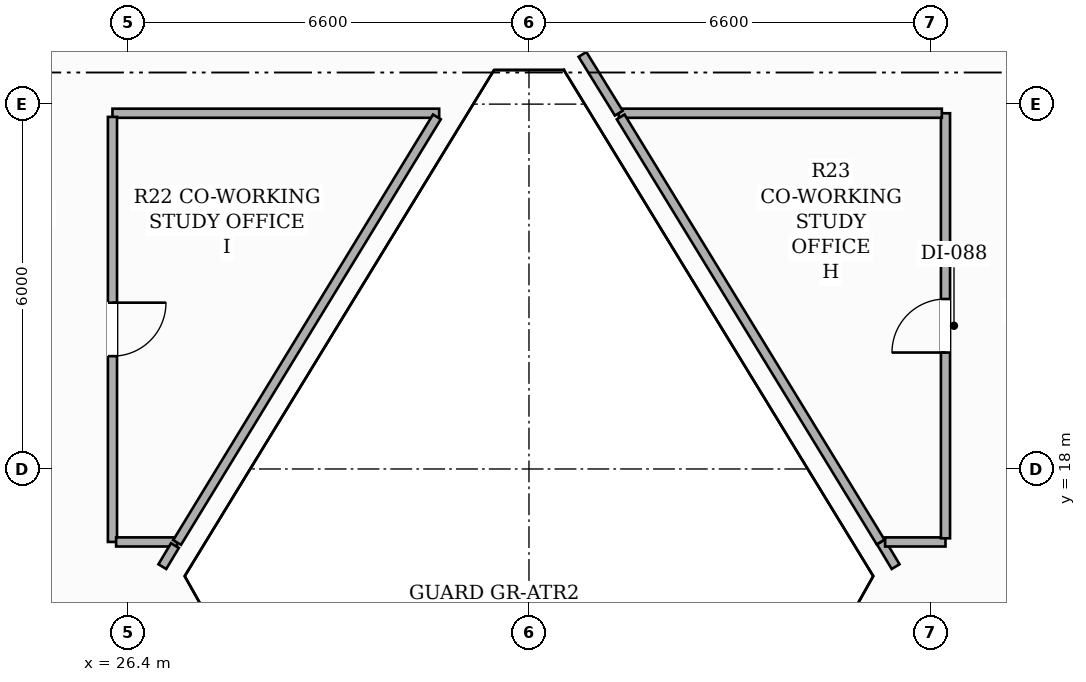
"""IFC4 building model, lengths in metres.
Left out: names, types, materials, properties, quantities, classifications, styles, units other than length and angle.
Written with IfcOpenShell. Run it as: python <this file> out.ifc"""

import sys

from ifc_helpers import new_model, si_unit, direction, frame, frame_2d, origin, place, context, subcontext, project, spatial, rectangle, extrude, element, fill, save


model = new_model("IFC4")
c1 = context("Model", 3, precision=1e-05, world=origin(), true_north=direction((0.0, 1.0)))
c2 = subcontext(c1, "Body", "Model", "MODEL_VIEW")
j1 = project(units=[si_unit("LENGTHUNIT", "METRE"), si_unit("PLANEANGLEUNIT", "RADIAN")], contexts=[c1])
p1 = place(None, origin())
s1 = spatial("IfcSite", under=j1, at=p1, CompositionType="ELEMENT")
p2 = place(p1, origin())
s2 = spatial("IfcBuilding", under=s1, at=p2, CompositionType="ELEMENT")
p3 = place(p2, frame((0.0, 0.0, 26.9)))
s3 = spatial("IfcBuildingStorey", under=s2, at=p3, CompositionType="ELEMENT", Elevation=26.9)
p4 = place(p3, frame((31.523, 23.85, 0.0), z_axis=(0.0, 0.0, 1.0), x_axis=(-1.0, 0.0, 0.0)))
e1 = element("IfcWall", 1, at=p4, inside=s3, PredefinedType="PARTITIONING", context=c2, shape_type="SweptSolid", body=[
    extrude(rectangle(XDim=5.373, YDim=0.15, at=frame_2d((2.687, 0.0))), origin(), (0.0, 0.0, 1.0), 2.669),
])
p5 = place(p3, frame((26.15, 23.79, 0.0), z_axis=(0.0, 0.0, 1.0), x_axis=(0.0, -1.0, 0.0)))
e2 = element("IfcWall", 2, at=p5, inside=s3, PredefinedType="PARTITIONING", context=c2, shape_type="SweptSolid", body=[
    extrude(rectangle(XDim=6.99, YDim=0.15, at=frame_2d((3.495, 0.0))), origin(), (0.0, 0.0, 1.0), 2.669),
])
p6 = place(p5, frame((3.055, 0.0, 0.0)))
e3 = element("IfcOpeningElement", 3, at=p6, cuts=e2, PredefinedType="OPENING", context=c2, shape_type="SweptSolid", body=[
    extrude(rectangle(XDim=0.88, YDim=2.1, at=frame_2d((0.44, 1.05))), frame((0.0, 0.085, 0.0), z_axis=(0.0, -1.0, 0.0), x_axis=(1.0, 0.0, 0.0)), (0.0, 0.0, 1.0), 0.17),
])
p7 = place(p3, frame((26.21, 16.8, 0.0), z_axis=(0.0, 0.0, 1.0), x_axis=(1.0, 0.0, 0.0)))
e4 = element("IfcWall", 4, at=p7, inside=s3, PredefinedType="PARTITIONING", context=c2, shape_type="SweptSolid", body=[
    extrude(rectangle(XDim=1.003, YDim=0.15, at=frame_2d((0.501, 0.0))), origin(), (0.0, 0.0, 1.0), 3.06),
])
p8 = place(p3, frame((27.177, 16.74, 0.0), z_axis=(0.0, 0.0, 1.0), x_axis=(-0.513515835534, -0.858080116688, 0.0)))
e5 = element("IfcWall", 5, at=p8, inside=s3, PredefinedType="PARTITIONING", context=c2, shape_type="SweptSolid", body=[
    extrude(rectangle(XDim=0.403, YDim=0.15, at=frame_2d((0.202, 0.0))), origin(), (0.0, 0.0, 1.0), 3.06),
])
p9 = place(p3, frame((39.03, 16.394, 0.0), z_axis=(0.0, 0.0, 1.0), x_axis=(-0.51343298076, 0.858129695482, 0.0)))
e6 = element("IfcWall", 6, at=p9, inside=s3, PredefinedType="PARTITIONING", context=c2, shape_type="SweptSolid", body=[
    extrude(rectangle(XDim=0.473, YDim=0.15, at=frame_2d((0.237, 0.0))), origin(), (0.0, 0.0, 1.0), 3.06),
])
p10 = place(p3, frame((38.857, 16.8, 0.0), z_axis=(0.0, 0.0, 1.0), x_axis=(1.0, 0.0, 0.0)))
e7 = element("IfcWall", 7, at=p10, inside=s3, PredefinedType="PARTITIONING", context=c2, shape_type="SweptSolid", body=[
    extrude(rectangle(XDim=0.993, YDim=0.15, at=frame_2d((0.497, 0.0))), origin(), (0.0, 0.0, 1.0), 3.06),
])
p11 = place(p3, frame((39.85, 16.86, 0.0), z_axis=(0.0, 0.0, 1.0), x_axis=(0.0, 1.0, 0.0)))
e8 = element("IfcWall", 8, at=p11, inside=s3, PredefinedType="PARTITIONING", context=c2, shape_type="SweptSolid", body=[
    extrude(rectangle(XDim=6.99, YDim=0.15, at=frame_2d((3.495, 0.0))), origin(), (0.0, 0.0, 1.0), 2.669),
])
p12 = place(p11, frame((3.055, 0.0, 0.0)))
e9 = element("IfcOpeningElement", 9, at=p12, cuts=e8, PredefinedType="OPENING", context=c2, shape_type="SweptSolid", body=[
    extrude(rectangle(XDim=0.88, YDim=2.1, at=frame_2d((0.44, 1.05))), frame((0.0, 0.085, 0.0), z_axis=(0.0, -1.0, 0.0), x_axis=(1.0, 0.0, 0.0)), (0.0, 0.0, 1.0), 0.17),
])
p13 = place(p3, frame((39.79, 23.85, 0.0), z_axis=(0.0, 0.0, 1.0), x_axis=(-1.0, 0.0, 0.0)))
e10 = element("IfcWall", 10, at=p13, inside=s3, PredefinedType="PARTITIONING", context=c2, shape_type="SweptSolid", body=[
    extrude(rectangle(XDim=5.313, YDim=0.15, at=frame_2d((2.656, 0.0))), origin(), (0.0, 0.0, 1.0), 2.669),
])
p14 = place(p3, frame((34.477, 23.851, 0.0), z_axis=(0.0, 0.0, 1.0), x_axis=(-0.52541513414, 0.8508460124, 0.0)))
e11 = element("IfcWall", 11, at=p14, inside=s3, PredefinedType="PARTITIONING", context=c2, shape_type="SweptSolid", body=[
    extrude(rectangle(XDim=1.136, YDim=0.15, at=frame_2d((0.568, 0.0))), origin(), (0.0, 0.0, 1.0), 3.06),
])
p15 = place(p3, frame((27.213, 16.791, 0.0), z_axis=(0.0, 0.0, 1.0), x_axis=(0.521095914239, 0.853498124288, 0.0)))
e12 = element("IfcWall", 12, at=p15, inside=s3, PredefinedType="PARTITIONING", context=c2, shape_type="SweptSolid", body=[
    extrude(rectangle(XDim=8.2, YDim=0.15, at=frame_2d((4.1, 0.0))), origin(), (0.0, 0.0, 1.0), 2.669),
])
p16 = place(p3, frame((34.508, 23.79, 0.0), z_axis=(0.0, 0.0, 1.0), x_axis=(0.52163195406, -0.853170618636, 0.0)))
e13 = element("IfcWall", 13, at=p16, inside=s3, PredefinedType="PARTITIONING", context=c2, shape_type="SweptSolid", body=[
    extrude(rectangle(XDim=8.195, YDim=0.15, at=frame_2d((4.098, 0.0))), origin(), (0.0, 0.0, 1.0), 2.669),
])
p17 = place(p12, origin())
e14 = element("IfcDoor", 14, at=p17, inside=s3, OperationType="SINGLE_SWING_LEFT", PredefinedType="DOOR", context=c2, shape_type="SweptSolid", body=[
    extrude(rectangle(XDim=0.88, YDim=2.1, at=frame_2d((0.44, 1.05))), frame((0.0, 0.025, 0.0), z_axis=(0.0, -1.0, 0.0), x_axis=(1.0, 0.0, 0.0)), (0.0, 0.0, 1.0), 0.05),
])
fill(e9, e14)
p18 = place(p6, origin())
e15 = element("IfcDoor", 15, at=p18, inside=s3, OperationType="SINGLE_SWING_LEFT", PredefinedType="DOOR", context=c2, shape_type="SweptSolid", body=[
    extrude(rectangle(XDim=0.88, YDim=2.1, at=frame_2d((0.44, 1.05))), frame((0.0, 0.025, 0.0), z_axis=(0.0, -1.0, 0.0), x_axis=(1.0, 0.0, 0.0)), (0.0, 0.0, 1.0), 0.05),
])
fill(e3, e15)
save(model, sys.argv[1])
